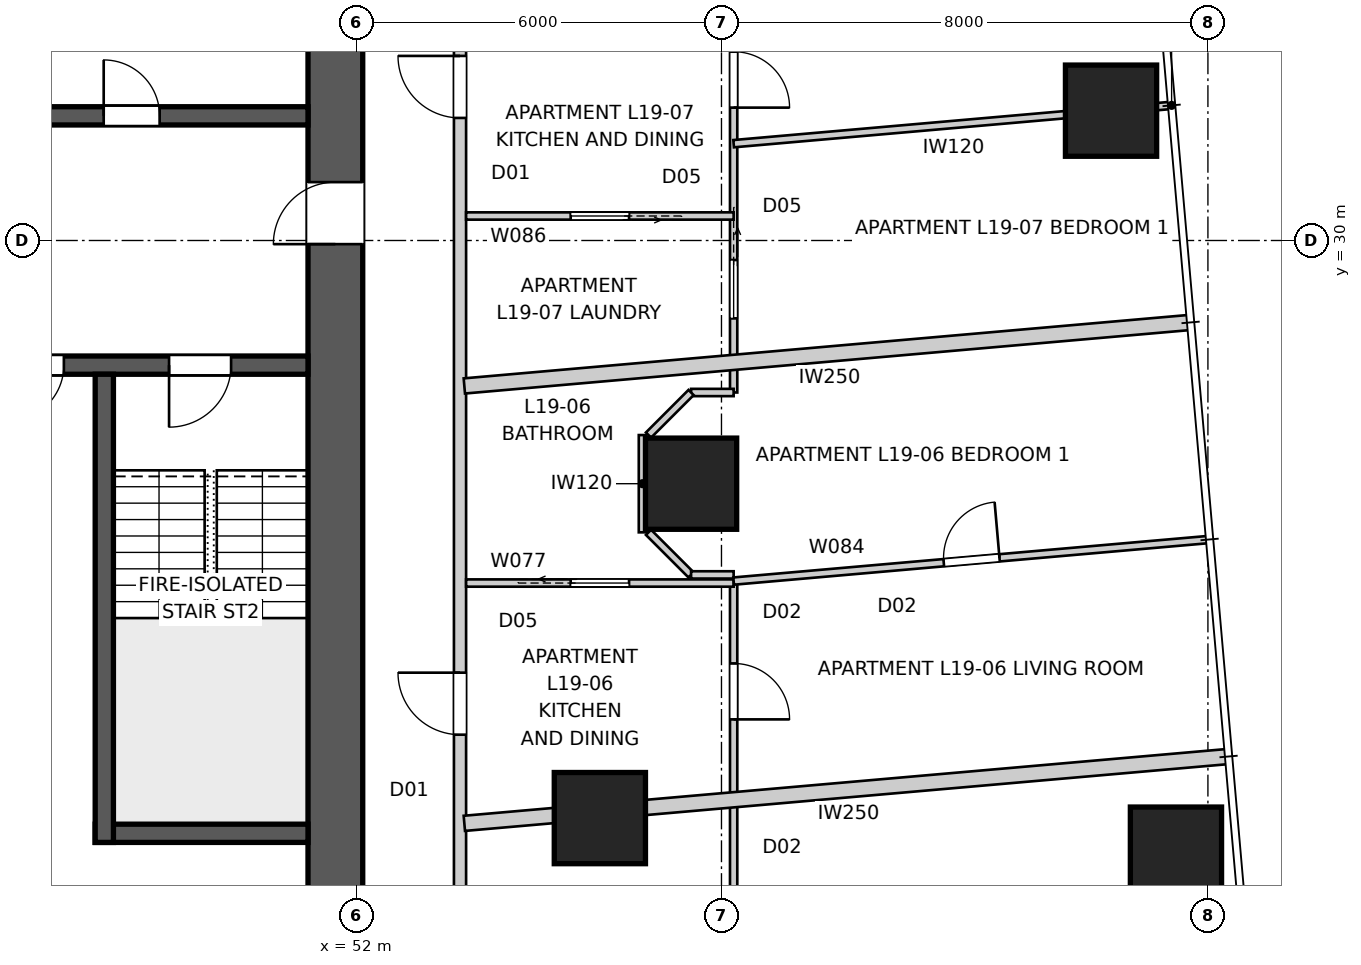
"""IFC4 building model, lengths in metres.
Left out: names, types, materials, properties, quantities, classifications, styles, units other than length and angle.
Written with IfcOpenShell. Run it as: python <this file> out.ifc"""

import sys

from ifc_helpers import new_model, si_unit, direction, frame, frame_2d, origin, origin_2d, place, context, subcontext, project, spatial, polyline, rectangle, outline, extrude, element, fill, save


model = new_model("IFC4")
c1 = context("Model", 3, precision=1e-05, world=origin(), true_north=direction((0.0, 1.0)))
c2 = subcontext(c1, "Body", "Model", "MODEL_VIEW")
j1 = project(units=[si_unit("LENGTHUNIT", "METRE"), si_unit("PLANEANGLEUNIT", "RADIAN")], contexts=[c1])
p1 = place(None, origin())
s1 = spatial("IfcSite", under=j1, at=p1, CompositionType="ELEMENT")
p2 = place(p1, origin())
s2 = spatial("IfcBuilding", under=s1, at=p2, CompositionType="ELEMENT")
p3 = place(p2, frame((0.0, 0.0, 71.0)))
s3 = spatial("IfcBuildingStorey", under=s2, at=p3, CompositionType="ELEMENT", Elevation=71.0)
p4 = place(p3, frame((51.65, 18.8, 0.0), z_axis=(0.0, 0.0, 1.0), x_axis=(0.0, 1.0, 0.0)))
e1 = element("IfcWall", 1, at=p4, inside=s3, PredefinedType="SHEAR", context=c2, shape_type="SweptSolid", body=[
    extrude(outline(polyline([(0.0, -0.45), (22.4, -0.45), (22.4, -0.025), (22.85, -0.025), (22.85, 0.025), (22.4, 0.025), (22.4, 0.45), (0.0, 0.45), (0.0, 0.025), (-0.45, 0.025), (-0.45, -0.025), (0.0, -0.025), (0.0, -0.45)])), origin(), (0.0, 0.0, 1.0), 3.4),
])
p5 = place(p4, frame((11.14, 0.0, 0.0)))
e2 = element("IfcOpeningElement", 2, at=p5, cuts=e1, PredefinedType="OPENING", context=c2, shape_type="SweptSolid", body=[
    extrude(rectangle(XDim=1.02, YDim=2.4, at=frame_2d((0.51, 1.2))), frame((0.0, 0.46, 0.0), z_axis=(0.0, -1.0, 0.0), x_axis=(1.0, 0.0, 0.0)), (0.0, 0.0, 1.0), 0.92),
])
p6 = place(p3, frame((28.8, 32.05, 0.0), z_axis=(0.0, 0.0, 1.0), x_axis=(1.0, 0.0, 0.0)))
e3 = element("IfcWall", 3, at=p6, inside=s3, PredefinedType="SHEAR", context=c2, shape_type="SweptSolid", body=[
    extrude(rectangle(XDim=22.4, YDim=0.3, at=frame_2d((11.2, 0.0))), origin(), (0.0, 0.0, 1.0), 3.4),
])
p7 = place(p6, frame((19.04, 0.0, 0.0)))
e4 = element("IfcOpeningElement", 4, at=p7, cuts=e3, PredefinedType="OPENING", context=c2, shape_type="SweptSolid", body=[
    extrude(rectangle(XDim=0.92, YDim=2.1, at=frame_2d((0.46, 1.05))), frame((0.0, 0.16, 0.0), z_axis=(0.0, -1.0, 0.0), x_axis=(1.0, 0.0, 0.0)), (0.0, 0.0, 1.0), 0.32),
])
p8 = place(p6, frame((1.265, 0.0, 0.0)))
e5 = element("IfcOpeningElement", 5, at=p8, cuts=e3, PredefinedType="OPENING", context=c2, shape_type="SweptSolid", body=[
    extrude(rectangle(XDim=1.02, YDim=2.1, at=frame_2d((0.51, 1.05))), frame((0.0, 0.16, 0.0), z_axis=(0.0, -1.0, 0.0), x_axis=(1.0, 0.0, 0.0)), (0.0, 0.0, 1.0), 0.32),
])
p9 = place(p6, frame((4.015, 0.0, 0.0)))
e6 = element("IfcOpeningElement", 6, at=p9, cuts=e3, PredefinedType="OPENING", context=c2, shape_type="SweptSolid", body=[
    extrude(rectangle(XDim=0.92, YDim=2.1, at=frame_2d((0.46, 1.05))), frame((0.0, 0.16, 0.0), z_axis=(0.0, -1.0, 0.0), x_axis=(1.0, 0.0, 0.0)), (0.0, 0.0, 1.0), 0.32),
])
p10 = place(p6, frame((6.45, 0.0, 0.0)))
e7 = element("IfcOpeningElement", 7, at=p10, cuts=e3, PredefinedType="OPENING", context=c2, shape_type="SweptSolid", body=[
    extrude(rectangle(XDim=1.1, YDim=2.1, at=frame_2d((0.55, 1.05))), frame((0.0, 0.16, 0.0), z_axis=(0.0, -1.0, 0.0), x_axis=(1.0, 0.0, 0.0)), (0.0, 0.0, 1.0), 0.32),
])
p11 = place(p6, frame((9.25, 0.0, 0.0)))
e8 = element("IfcOpeningElement", 8, at=p11, cuts=e3, PredefinedType="OPENING", context=c2, shape_type="SweptSolid", body=[
    extrude(rectangle(XDim=1.1, YDim=2.1, at=frame_2d((0.55, 1.05))), frame((0.0, 0.16, 0.0), z_axis=(0.0, -1.0, 0.0), x_axis=(1.0, 0.0, 0.0)), (0.0, 0.0, 1.0), 0.32),
])
p12 = place(p6, frame((14.85, 0.0, 0.0)))
e9 = element("IfcOpeningElement", 9, at=p12, cuts=e3, PredefinedType="OPENING", context=c2, shape_type="SweptSolid", body=[
    extrude(rectangle(XDim=1.1, YDim=2.1, at=frame_2d((0.55, 1.05))), frame((0.0, 0.16, 0.0), z_axis=(0.0, -1.0, 0.0), x_axis=(1.0, 0.0, 0.0)), (0.0, 0.0, 1.0), 0.32),
])
p13 = place(p3, frame((51.2, 27.95, 0.0), z_axis=(0.0, 0.0, 1.0), x_axis=(-1.0, 0.0, 0.0)))
e10 = element("IfcWall", 10, at=p13, inside=s3, PredefinedType="SHEAR", context=c2, shape_type="SweptSolid", body=[
    extrude(rectangle(XDim=22.4, YDim=0.3, at=frame_2d((11.2, 0.0))), origin(), (0.0, 0.0, 1.0), 3.4),
])
p14 = place(p13, frame((19.04, 0.0, 0.0)))
e11 = element("IfcOpeningElement", 11, at=p14, cuts=e10, PredefinedType="OPENING", context=c2, shape_type="SweptSolid", body=[
    extrude(rectangle(XDim=0.92, YDim=2.1, at=frame_2d((0.46, 1.05))), frame((0.0, 0.16, 0.0), z_axis=(0.0, -1.0, 0.0), x_axis=(1.0, 0.0, 0.0)), (0.0, 0.0, 1.0), 0.32),
])
p15 = place(p13, frame((1.265, 0.0, 0.0)))
e12 = element("IfcOpeningElement", 12, at=p15, cuts=e10, PredefinedType="OPENING", context=c2, shape_type="SweptSolid", body=[
    extrude(rectangle(XDim=1.02, YDim=2.1, at=frame_2d((0.51, 1.05))), frame((0.0, 0.16, 0.0), z_axis=(0.0, -1.0, 0.0), x_axis=(1.0, 0.0, 0.0)), (0.0, 0.0, 1.0), 0.32),
])
p16 = place(p13, frame((4.015, 0.0, 0.0)))
e13 = element("IfcOpeningElement", 13, at=p16, cuts=e10, PredefinedType="OPENING", context=c2, shape_type="SweptSolid", body=[
    extrude(rectangle(XDim=0.92, YDim=2.1, at=frame_2d((0.46, 1.05))), frame((0.0, 0.16, 0.0), z_axis=(0.0, -1.0, 0.0), x_axis=(1.0, 0.0, 0.0)), (0.0, 0.0, 1.0), 0.32),
])
p17 = place(p13, frame((14.85, 0.0, 0.0)))
e14 = element("IfcOpeningElement", 14, at=p17, cuts=e10, PredefinedType="OPENING", context=c2, shape_type="SweptSolid", body=[
    extrude(rectangle(XDim=1.1, YDim=2.1, at=frame_2d((0.55, 1.05))), frame((0.0, 0.16, 0.0), z_axis=(0.0, -1.0, 0.0), x_axis=(1.0, 0.0, 0.0)), (0.0, 0.0, 1.0), 0.32),
])
p18 = place(p3, frame((47.85, 27.8, 0.0), z_axis=(0.0, 0.0, 1.0), x_axis=(0.0, -1.0, 0.0)))
e15 = element("IfcWall", 15, at=p18, inside=s3, PredefinedType="SHEAR", context=c2, shape_type="SweptSolid", body=[
    extrude(rectangle(XDim=7.7, YDim=0.3, at=frame_2d((3.85, 0.0))), origin(), (0.0, 0.0, 1.0), 3.4),
])
p19 = place(p3, frame((51.2, 20.25, 0.0), z_axis=(0.0, 0.0, 1.0), x_axis=(-1.0, 0.0, 0.0)))
e16 = element("IfcWall", 16, at=p19, inside=s3, PredefinedType="SHEAR", context=c2, shape_type="SweptSolid", body=[
    extrude(rectangle(XDim=3.5, YDim=0.3, at=frame_2d((1.75, 0.0))), origin(), (0.0, 0.0, 1.0), 3.4),
])
for number, where, z_axis, x_axis in (
    (17, (65.474, 19.932, 0.0), (0.0, 0.0, 1.0), (1.0, 0.0, 0.0)),
    (18, (64.407, 32.135, 0.0), (0.0, 0.0, 1.0), (1.0, 0.0, 0.0)),
):
    element("IfcColumn", number, at=place(p3, frame(where, z_axis=z_axis, x_axis=x_axis)), inside=s3, PredefinedType="COLUMN", context=c2, shape_type="SweptSolid", body=[
        extrude(rectangle(XDim=1.5, YDim=1.5, at=origin_2d()), origin(), (0.0, 0.0, 1.0), 3.2),
    ])
for number, where, z_axis, x_axis in (
    (19, (57.5, 26.0, 0.0), (0.0, 0.0, 1.0), (1.0, 0.0, 0.0)),
    (20, (56.0, 20.5, 0.0), (0.0, 0.0, 1.0), (1.0, 0.0, 0.0)),
):
    element("IfcColumn", number, at=place(p3, frame(where, z_axis=z_axis, x_axis=x_axis)), inside=s3, PredefinedType="COLUMN", context=c2, shape_type="SweptSolid", body=[
        extrude(rectangle(XDim=1.5, YDim=1.5, at=origin_2d()), origin(), (0.0, 0.0, 1.0), 3.4),
    ])
p20 = place(p3, frame((53.7, 16.3, 0.0), z_axis=(0.0, 0.0, 1.0), x_axis=(0.0, 1.0, 0.0)))
e21 = element("IfcWall", 21, at=p20, inside=s3, PredefinedType="PARTITIONING", context=c2, shape_type="SweptSolid", body=[
    extrude(rectangle(XDim=28.2, YDim=0.2, at=frame_2d((14.1, 0.0))), origin(), (0.0, 0.0, 1.0), 3.2),
])
p21 = place(p20, frame((15.716, 0.0, 0.0)))
e22 = element("IfcOpeningElement", 22, at=p21, cuts=e21, PredefinedType="OPENING", context=c2, shape_type="SweptSolid", body=[
    extrude(rectangle(XDim=1.02, YDim=2.34, at=frame_2d((0.51, 1.17))), frame((0.0, 0.11, 0.0), z_axis=(0.0, -1.0, 0.0), x_axis=(1.0, 0.0, 0.0)), (0.0, 0.0, 1.0), 0.22),
])
p22 = place(p20, frame((5.572, 0.0, 0.0)))
e23 = element("IfcOpeningElement", 23, at=p22, cuts=e21, PredefinedType="OPENING", context=c2, shape_type="SweptSolid", body=[
    extrude(rectangle(XDim=1.02, YDim=2.34, at=frame_2d((0.51, 1.17))), frame((0.0, 0.11, 0.0), z_axis=(0.0, -1.0, 0.0), x_axis=(1.0, 0.0, 0.0)), (0.0, 0.0, 1.0), 0.22),
])
p23 = place(p20, frame((1.565, 0.0, 0.0)))
e24 = element("IfcOpeningElement", 24, at=p23, cuts=e21, PredefinedType="OPENING", context=c2, shape_type="SweptSolid", body=[
    extrude(rectangle(XDim=1.02, YDim=2.0, at=frame_2d((0.51, 1.0))), frame((0.0, 0.11, 0.0), z_axis=(0.0, -1.0, 0.0), x_axis=(1.0, 0.0, 0.0)), (0.0, 0.0, 1.0), 0.22),
])
p24 = place(p3, frame((65.715, 28.653, 0.0), z_axis=(0.0, 0.0, 1.0), x_axis=(-0.996195220272, -0.087149773992, 0.0)))
e25 = element("IfcWall", 25, at=p24, inside=s3, PredefinedType="PARTITIONING", context=c2, shape_type="SweptSolid", body=[
    extrude(rectangle(XDim=11.99, YDim=0.25, at=frame_2d((5.995, 0.0))), origin(), (0.0, 0.0, 1.0), 3.2),
])
p25 = place(p3, frame((66.34, 21.513, 0.0), z_axis=(0.0, 0.0, 1.0), x_axis=(-0.996194851608, -0.087153988028, 0.0)))
e26 = element("IfcWall", 26, at=p25, inside=s3, PredefinedType="PARTITIONING", context=c2, shape_type="SweptSolid", body=[
    extrude(rectangle(XDim=12.617, YDim=0.25, at=frame_2d((6.309, 0.0))), origin(), (0.0, 0.0, 1.0), 3.2),
])
p26 = place(p3, frame((58.2, 24.366, 0.0), z_axis=(0.0, 0.0, 1.0), x_axis=(0.0, -1.0, 0.0)))
e27 = element("IfcWall", 27, at=p26, inside=s3, PredefinedType="PARTITIONING", context=c2, shape_type="SweptSolid", body=[
    extrude(rectangle(XDim=12.566, YDim=0.12, at=frame_2d((6.283, 0.0))), origin(), (0.0, 0.0, 1.0), 3.2),
])
p27 = place(p26, frame((1.322, 0.0, 0.0)))
e28 = element("IfcOpeningElement", 28, at=p27, cuts=e27, PredefinedType="OPENING", context=c2, shape_type="SweptSolid", body=[
    extrude(rectangle(XDim=0.92, YDim=2.34, at=frame_2d((0.46, 1.17))), frame((0.0, 0.07, 0.0), z_axis=(0.0, -1.0, 0.0), x_axis=(1.0, 0.0, 0.0)), (0.0, 0.0, 1.0), 0.14),
])
p28 = place(p26, frame((5.188, 0.0, 0.0)))
e29 = element("IfcOpeningElement", 29, at=p28, cuts=e27, PredefinedType="OPENING", context=c2, shape_type="SweptSolid", body=[
    extrude(rectangle(XDim=0.92, YDim=2.34, at=frame_2d((0.46, 1.17))), frame((0.0, 0.07, 0.0), z_axis=(0.0, -1.0, 0.0), x_axis=(1.0, 0.0, 0.0)), (0.0, 0.0, 1.0), 0.14),
])
p29 = place(p3, frame((53.8, 24.366, 0.0), z_axis=(0.0, 0.0, 1.0), x_axis=(1.0, 0.0, 0.0)))
e30 = element("IfcWall", 30, at=p29, inside=s3, PredefinedType="PARTITIONING", context=c2, shape_type="SweptSolid", body=[
    extrude(rectangle(XDim=4.4, YDim=0.12, at=frame_2d((2.2, 0.0))), origin(), (0.0, 0.0, 1.0), 2.588),
])
p30 = place(p29, frame((1.72, 0.0, 0.0)))
e31 = element("IfcOpeningElement", 31, at=p30, cuts=e30, PredefinedType="OPENING", context=c2, shape_type="SweptSolid", body=[
    extrude(rectangle(XDim=0.96, YDim=2.1, at=frame_2d((0.48, 1.05))), frame((0.0, 0.07, 0.0), z_axis=(0.0, -1.0, 0.0), x_axis=(1.0, 0.0, 0.0)), (0.0, 0.0, 1.0), 0.14),
])
p31 = place(p3, frame((58.2, 48.2, 0.0), z_axis=(0.0, 0.0, 1.0), x_axis=(0.0, -1.0, 0.0)))
e32 = element("IfcWall", 32, at=p31, inside=s3, PredefinedType="PARTITIONING", context=c2, shape_type="SweptSolid", body=[
    extrude(rectangle(XDim=20.7, YDim=0.12, at=frame_2d((10.35, 0.0))), origin(), (0.0, 0.0, 1.0), 3.2),
])
p32 = place(p31, frame((15.095, 0.0, 0.0)))
e33 = element("IfcOpeningElement", 33, at=p32, cuts=e32, PredefinedType="OPENING", context=c2, shape_type="SweptSolid", body=[
    extrude(rectangle(XDim=0.92, YDim=2.34, at=frame_2d((0.46, 1.17))), frame((0.0, 0.07, 0.0), z_axis=(0.0, -1.0, 0.0), x_axis=(1.0, 0.0, 0.0)), (0.0, 0.0, 1.0), 0.14),
])
p33 = place(p31, frame((18.521, 0.0, 0.0)))
e34 = element("IfcOpeningElement", 34, at=p33, cuts=e32, PredefinedType="OPENING", context=c2, shape_type="SweptSolid", body=[
    extrude(rectangle(XDim=0.96, YDim=2.1, at=frame_2d((0.48, 1.05))), frame((0.0, 0.07, 0.0), z_axis=(0.0, -1.0, 0.0), x_axis=(1.0, 0.0, 0.0)), (0.0, 0.0, 1.0), 0.14),
])
p34 = place(p31, frame((0.675, 0.0, 0.0)))
e35 = element("IfcOpeningElement", 35, at=p34, cuts=e32, PredefinedType="OPENING", context=c2, shape_type="SweptSolid", body=[
    extrude(rectangle(XDim=0.92, YDim=2.34, at=frame_2d((0.46, 1.17))), frame((0.0, 0.07, 0.0), z_axis=(0.0, -1.0, 0.0), x_axis=(1.0, 0.0, 0.0)), (0.0, 0.0, 1.0), 0.14),
])
p35 = place(p31, frame((3.872, 0.0, 0.0)))
e36 = element("IfcOpeningElement", 36, at=p35, cuts=e32, PredefinedType="OPENING", context=c2, shape_type="SweptSolid", body=[
    extrude(rectangle(XDim=0.96, YDim=2.1, at=frame_2d((0.48, 1.05))), frame((0.0, 0.07, 0.0), z_axis=(0.0, -1.0, 0.0), x_axis=(1.0, 0.0, 0.0)), (0.0, 0.0, 1.0), 0.14),
])
p36 = place(p3, frame((58.2, 27.5, 0.0), z_axis=(0.0, 0.0, 1.0), x_axis=(-1.0, 0.0, 0.0)))
e37 = element("IfcWall", 37, at=p36, inside=s3, PredefinedType="PARTITIONING", context=c2, shape_type="SweptSolid", body=[
    extrude(rectangle(XDim=0.7, YDim=0.12, at=frame_2d((0.35, 0.0))), origin(), (0.0, 0.0, 1.0), 3.2),
])
p37 = place(p3, frame((57.5, 27.5, 0.0), z_axis=(0.0, 0.0, 1.0), x_axis=(-0.707106781187, -0.707106781187, 0.0)))
e38 = element("IfcWall", 38, at=p37, inside=s3, PredefinedType="PARTITIONING", context=c2, shape_type="SweptSolid", body=[
    extrude(rectangle(XDim=0.99, YDim=0.12, at=frame_2d((0.495, 0.0))), origin(), (0.0, 0.0, 1.0), 3.2),
])
p38 = place(p3, frame((56.7, 26.8, 0.0), z_axis=(0.0, 0.0, 1.0), x_axis=(0.0, -1.0, 0.0)))
e39 = element("IfcWall", 39, at=p38, inside=s3, PredefinedType="PARTITIONING", context=c2, shape_type="SweptSolid", body=[
    extrude(rectangle(XDim=1.6, YDim=0.12, at=frame_2d((0.8, 0.0))), origin(), (0.0, 0.0, 1.0), 3.2),
])
p39 = place(p3, frame((56.8, 25.2, 0.0), z_axis=(0.0, 0.0, 1.0), x_axis=(0.707106781187, -0.707106781187, 0.0)))
e40 = element("IfcWall", 40, at=p39, inside=s3, PredefinedType="PARTITIONING", context=c2, shape_type="SweptSolid", body=[
    extrude(rectangle(XDim=0.99, YDim=0.12, at=frame_2d((0.495, 0.0))), origin(), (0.0, 0.0, 1.0), 3.2),
])
p40 = place(p3, frame((57.5, 24.5, 0.0), z_axis=(0.0, 0.0, 1.0), x_axis=(1.0, 0.0, 0.0)))
e41 = element("IfcWall", 41, at=p40, inside=s3, PredefinedType="PARTITIONING", context=c2, shape_type="SweptSolid", body=[
    extrude(rectangle(XDim=0.7, YDim=0.12, at=frame_2d((0.35, 0.0))), origin(), (0.0, 0.0, 1.0), 2.588),
])
p41 = place(p3, frame((58.2, 24.398, 0.0), z_axis=(0.0, 0.0, 1.0), x_axis=(0.996194158156, 0.087161914023, 0.0)))
e42 = element("IfcWall", 42, at=p41, inside=s3, PredefinedType="PARTITIONING", context=c2, shape_type="SweptSolid", body=[
    extrude(rectangle(XDim=7.818, YDim=0.12, at=frame_2d((3.909, 0.0))), origin(), (0.0, 0.0, 1.0), 2.588),
])
p42 = place(p41, frame((3.469, 0.0, 0.0)))
e43 = element("IfcOpeningElement", 43, at=p42, cuts=e42, PredefinedType="OPENING", context=c2, shape_type="SweptSolid", body=[
    extrude(rectangle(XDim=0.92, YDim=2.34, at=frame_2d((0.46, 1.17))), frame((0.0, 0.07, 0.0), z_axis=(0.0, -1.0, 0.0), x_axis=(1.0, 0.0, 0.0)), (0.0, 0.0, 1.0), 0.14),
])
p43 = place(p3, frame((58.2, 30.403, 0.0), z_axis=(0.0, 0.0, 1.0), x_axis=(-1.0, 0.0, 0.0)))
e44 = element("IfcWall", 44, at=p43, inside=s3, PredefinedType="PARTITIONING", context=c2, shape_type="SweptSolid", body=[
    extrude(rectangle(XDim=4.4, YDim=0.12, at=frame_2d((2.2, 0.0))), origin(), (0.0, 0.0, 1.0), 3.2),
])
p44 = place(p43, frame((1.72, 0.0, 0.0)))
e45 = element("IfcOpeningElement", 45, at=p44, cuts=e44, PredefinedType="OPENING", context=c2, shape_type="SweptSolid", body=[
    extrude(rectangle(XDim=0.96, YDim=2.1, at=frame_2d((0.48, 1.05))), frame((0.0, 0.07, 0.0), z_axis=(0.0, -1.0, 0.0), x_axis=(1.0, 0.0, 0.0)), (0.0, 0.0, 1.0), 0.14),
])
p45 = place(p3, frame((65.363, 32.219, 0.0), z_axis=(0.0, 0.0, 1.0), x_axis=(-0.996194454549, -0.087158526409, 0.0)))
e46 = element("IfcWall", 46, at=p45, inside=s3, PredefinedType="PARTITIONING", context=c2, shape_type="SweptSolid", body=[
    extrude(rectangle(XDim=7.19, YDim=0.12, at=frame_2d((3.595, 0.0))), origin(), (0.0, 0.0, 1.0), 3.2),
])
p46 = place(p7, origin())
e47 = element("IfcDoor", 47, at=p46, inside=s3, OperationType="SINGLE_SWING_LEFT", PredefinedType="DOOR", context=c2, shape_type="SweptSolid", body=[
    extrude(rectangle(XDim=0.92, YDim=2.1, at=frame_2d((0.46, 1.05))), frame((0.0, 0.025, 0.0), z_axis=(0.0, -1.0, 0.0), x_axis=(1.0, 0.0, 0.0)), (0.0, 0.0, 1.0), 0.05),
])
fill(e4, e47)
p47 = place(p15, origin())
e48 = element("IfcDoor", 48, at=p47, inside=s3, OperationType="SINGLE_SWING_RIGHT", PredefinedType="DOOR", context=c2, shape_type="SweptSolid", body=[
    extrude(rectangle(XDim=1.02, YDim=2.1, at=frame_2d((0.51, 1.05))), frame((0.0, 0.025, 0.0), z_axis=(0.0, -1.0, 0.0), x_axis=(1.0, 0.0, 0.0)), (0.0, 0.0, 1.0), 0.05),
])
fill(e12, e48)
p48 = place(p16, origin())
e49 = element("IfcDoor", 49, at=p48, inside=s3, OperationType="SINGLE_SWING_RIGHT", PredefinedType="DOOR", context=c2, shape_type="SweptSolid", body=[
    extrude(rectangle(XDim=0.92, YDim=2.1, at=frame_2d((0.46, 1.05))), frame((0.0, 0.025, 0.0), z_axis=(0.0, -1.0, 0.0), x_axis=(1.0, 0.0, 0.0)), (0.0, 0.0, 1.0), 0.05),
])
fill(e13, e49)
p49 = place(p21, origin())
e50 = element("IfcDoor", 50, at=p49, inside=s3, OperationType="SINGLE_SWING_RIGHT", PredefinedType="DOOR", context=c2, shape_type="SweptSolid", body=[
    extrude(rectangle(XDim=1.02, YDim=2.34, at=frame_2d((0.51, 1.17))), frame((0.0, 0.025, 0.0), z_axis=(0.0, -1.0, 0.0), x_axis=(1.0, 0.0, 0.0)), (0.0, 0.0, 1.0), 0.05),
])
fill(e22, e50)
p50 = place(p22, origin())
e51 = element("IfcDoor", 51, at=p50, inside=s3, OperationType="SINGLE_SWING_RIGHT", PredefinedType="DOOR", context=c2, shape_type="SweptSolid", body=[
    extrude(rectangle(XDim=1.02, YDim=2.34, at=frame_2d((0.51, 1.17))), frame((0.0, 0.025, 0.0), z_axis=(0.0, -1.0, 0.0), x_axis=(1.0, 0.0, 0.0)), (0.0, 0.0, 1.0), 0.05),
])
fill(e23, e51)
p51 = place(p44, origin())
e52 = element("IfcDoor", 52, at=p51, inside=s3, OperationType="SLIDING_TO_LEFT", PredefinedType="DOOR", context=c2, shape_type="SweptSolid", body=[
    extrude(rectangle(XDim=0.96, YDim=2.1, at=frame_2d((0.48, 1.05))), frame((0.0, 0.025, 0.0), z_axis=(0.0, -1.0, 0.0), x_axis=(1.0, 0.0, 0.0)), (0.0, 0.0, 1.0), 0.05),
])
fill(e45, e52)
p52 = place(p32, origin())
e53 = element("IfcDoor", 53, at=p52, inside=s3, OperationType="SINGLE_SWING_RIGHT", PredefinedType="DOOR", context=c2, shape_type="SweptSolid", body=[
    extrude(rectangle(XDim=0.92, YDim=2.34, at=frame_2d((0.46, 1.17))), frame((0.0, 0.025, 0.0), z_axis=(0.0, -1.0, 0.0), x_axis=(1.0, 0.0, 0.0)), (0.0, 0.0, 1.0), 0.05),
])
fill(e33, e53)
p53 = place(p30, origin())
e54 = element("IfcDoor", 54, at=p53, inside=s3, OperationType="SLIDING_TO_LEFT", PredefinedType="DOOR", context=c2, shape_type="SweptSolid", body=[
    extrude(rectangle(XDim=0.96, YDim=2.1, at=frame_2d((0.48, 1.05))), frame((0.0, 0.025, 0.0), z_axis=(0.0, -1.0, 0.0), x_axis=(1.0, 0.0, 0.0)), (0.0, 0.0, 1.0), 0.05),
])
fill(e31, e54)
p54 = place(p27, origin())
e55 = element("IfcDoor", 55, at=p54, inside=s3, OperationType="SINGLE_SWING_RIGHT", PredefinedType="DOOR", context=c2, shape_type="SweptSolid", body=[
    extrude(rectangle(XDim=0.92, YDim=2.34, at=frame_2d((0.46, 1.17))), frame((0.0, 0.025, 0.0), z_axis=(0.0, -1.0, 0.0), x_axis=(1.0, 0.0, 0.0)), (0.0, 0.0, 1.0), 0.05),
])
fill(e28, e55)
p55 = place(p33, origin())
e56 = element("IfcDoor", 56, at=p55, inside=s3, OperationType="SLIDING_TO_LEFT", PredefinedType="DOOR", context=c2, shape_type="SweptSolid", body=[
    extrude(rectangle(XDim=0.96, YDim=2.1, at=frame_2d((0.48, 1.05))), frame((0.0, 0.025, 0.0), z_axis=(0.0, -1.0, 0.0), x_axis=(1.0, 0.0, 0.0)), (0.0, 0.0, 1.0), 0.05),
])
fill(e34, e56)
p56 = place(p42, origin())
e57 = element("IfcDoor", 57, at=p56, inside=s3, OperationType="SINGLE_SWING_RIGHT", PredefinedType="DOOR", context=c2, shape_type="SweptSolid", body=[
    extrude(rectangle(XDim=0.92, YDim=2.34, at=frame_2d((0.46, 1.17))), frame((0.0, 0.025, 0.0), z_axis=(0.0, -1.0, 0.0), x_axis=(1.0, 0.0, 0.0)), (0.0, 0.0, 1.0), 0.05),
])
fill(e43, e57)
p57 = place(p5, origin())
e58 = element("IfcDoor", 58, at=p57, inside=s3, OperationType="SINGLE_SWING_LEFT", PredefinedType="DOOR", context=c2, shape_type="SweptSolid", body=[
    extrude(rectangle(XDim=1.02, YDim=2.4, at=frame_2d((0.51, 1.2))), frame((0.0, 0.025, 0.0), z_axis=(0.0, -1.0, 0.0), x_axis=(1.0, 0.0, 0.0)), (0.0, 0.0, 1.0), 0.05),
])
fill(e2, e58)
save(model, sys.argv[1])
